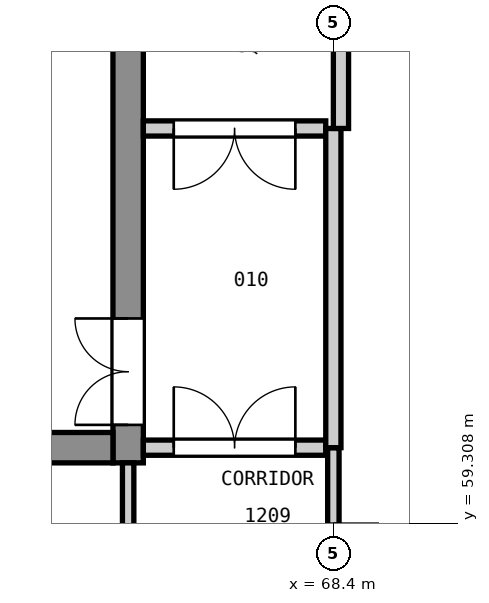
"""IFC4 building model, lengths in metres.
Left out: names, types, materials, properties, quantities, classifications, styles, units other than length and angle.
Written with IfcOpenShell. Run it as: python <this file> out.ifc"""

import sys

from ifc_helpers import new_model, si_unit, direction, frame, frame_2d, origin, place, context, subcontext, project, spatial, rectangle, extrude, element, fill, save


model = new_model("IFC4")
c1 = context("Model", 3, precision=1e-05, world=origin(), true_north=direction((0.0, 1.0)))
c2 = subcontext(c1, "Body", "Model", "MODEL_VIEW")
j1 = project(units=[si_unit("LENGTHUNIT", "METRE"), si_unit("PLANEANGLEUNIT", "RADIAN")], contexts=[c1])
p1 = place(None, origin())
s1 = spatial("IfcSite", under=j1, at=p1, CompositionType="ELEMENT")
p2 = place(p1, origin())
s2 = spatial("IfcBuilding", under=s1, at=p2, CompositionType="ELEMENT")
p3 = place(p2, frame((0.0, 0.0, 60.6)))
s3 = spatial("IfcBuildingStorey", under=s2, at=p3, CompositionType="ELEMENT", Elevation=60.6)
p4 = place(p3, frame((65.7, 60.1, 0.0), z_axis=(0.0, 0.0, 1.0), x_axis=(0.0, 1.0, 0.0)))
e1 = element("IfcWall", 1, at=p4, inside=s3, PredefinedType="SHEAR", context=c2, shape_type="SweptSolid", body=[
    extrude(rectangle(XDim=14.8, YDim=0.4, at=frame_2d((7.4, 0.0))), origin(), (0.0, 0.0, 1.0), 4.55),
])
p5 = place(p4, frame((0.5, 0.0, 0.0)))
e2 = element("IfcOpeningElement", 2, at=p5, cuts=e1, PredefinedType="OPENING", context=c2, shape_type="SweptSolid", body=[
    extrude(rectangle(XDim=1.4, YDim=2.1, at=frame_2d((0.7, 1.05))), frame((0.0, 0.21, 0.0), z_axis=(0.0, -1.0, 0.0), x_axis=(1.0, 0.0, 0.0)), (0.0, 0.0, 1.0), 0.42),
])
p6 = place(p4, frame((8.8, 0.0, 0.0)))
e3 = element("IfcOpeningElement", 3, at=p6, cuts=e1, PredefinedType="OPENING", context=c2, shape_type="SweptSolid", body=[
    extrude(rectangle(XDim=1.1, YDim=2.1, at=frame_2d((0.55, 1.05))), frame((0.0, 0.21, 0.0), z_axis=(0.0, -1.0, 0.0), x_axis=(1.0, 0.0, 0.0)), (0.0, 0.0, 1.0), 0.42),
])
p7 = place(p4, frame((11.35, 0.0, 0.0)))
e4 = element("IfcOpeningElement", 4, at=p7, cuts=e1, PredefinedType="OPENING", context=c2, shape_type="SweptSolid", body=[
    extrude(rectangle(XDim=1.1, YDim=2.1, at=frame_2d((0.55, 1.05))), frame((0.0, 0.21, 0.0), z_axis=(0.0, -1.0, 0.0), x_axis=(1.0, 0.0, 0.0)), (0.0, 0.0, 1.0), 0.42),
])
p8 = place(p3, frame((61.4, 60.3, 0.0), z_axis=(0.0, 0.0, 1.0), x_axis=(1.0, 0.0, 0.0)))
e5 = element("IfcWall", 5, at=p8, inside=s3, PredefinedType="SHEAR", context=c2, shape_type="SweptSolid", body=[
    extrude(rectangle(XDim=4.1, YDim=0.4, at=frame_2d((2.05, 0.0))), origin(), (0.0, 0.0, 1.0), 4.55),
])
p9 = place(p3, frame((65.7, 56.85, 0.0), z_axis=(0.0, 0.0, 1.0), x_axis=(0.0, 1.0, 0.0)))
e6 = element("IfcWall", 6, at=p9, inside=s3, PredefinedType="PARTITIONING", context=c2, shape_type="SweptSolid", body=[
    extrude(rectangle(XDim=3.25, YDim=0.15, at=frame_2d((1.625, 0.0))), origin(), (0.0, 0.0, 1.0), 3.55),
])
p10 = place(p9, frame((1.15, 0.0, 0.0)))
e7 = element("IfcOpeningElement", 7, at=p10, cuts=e6, PredefinedType="OPENING", context=c2, shape_type="SweptSolid", body=[
    extrude(rectangle(XDim=1.0, YDim=2.1, at=frame_2d((0.5, 1.05))), frame((0.0, 0.085, 0.0), z_axis=(0.0, -1.0, 0.0), x_axis=(1.0, 0.0, 0.0)), (0.0, 0.0, 1.0), 0.17),
])
p11 = place(p3, frame((65.9, 60.3, 0.0), z_axis=(0.0, 0.0, 1.0), x_axis=(1.0, 0.0, 0.0)))
e8 = element("IfcWall", 8, at=p11, inside=s3, PredefinedType="PARTITIONING", context=c2, shape_type="SweptSolid", body=[
    extrude(rectangle(XDim=2.4, YDim=0.2, at=frame_2d((1.2, 0.0))), origin(), (0.0, 0.0, 1.0), 3.85),
])
p12 = place(p11, frame((0.4, 0.0, 0.0)))
e9 = element("IfcOpeningElement", 9, at=p12, cuts=e8, PredefinedType="OPENING", context=c2, shape_type="SweptSolid", body=[
    extrude(rectangle(XDim=1.6, YDim=2.1, at=frame_2d((0.8, 1.05))), frame((0.0, 0.11, 0.0), z_axis=(0.0, -1.0, 0.0), x_axis=(1.0, 0.0, 0.0)), (0.0, 0.0, 1.0), 0.22),
])
p13 = place(p3, frame((65.9, 64.5, 0.0), z_axis=(0.0, 0.0, 1.0), x_axis=(1.0, 0.0, 0.0)))
e10 = element("IfcWall", 10, at=p13, inside=s3, PredefinedType="PARTITIONING", context=c2, shape_type="SweptSolid", body=[
    extrude(rectangle(XDim=2.4, YDim=0.2, at=frame_2d((1.2, 0.0))), origin(), (0.0, 0.0, 1.0), 3.55),
])
p14 = place(p13, frame((0.4, 0.0, 0.0)))
e11 = element("IfcOpeningElement", 11, at=p14, cuts=e10, PredefinedType="OPENING", context=c2, shape_type="SweptSolid", body=[
    extrude(rectangle(XDim=1.6, YDim=2.1, at=frame_2d((0.8, 1.05))), frame((0.0, 0.11, 0.0), z_axis=(0.0, -1.0, 0.0), x_axis=(1.0, 0.0, 0.0)), (0.0, 0.0, 1.0), 0.22),
])
p15 = place(p3, frame((68.4, 57.1, 0.0), z_axis=(0.0, 0.0, 1.0), x_axis=(0.0, 1.0, 0.0)))
e12 = element("IfcWall", 12, at=p15, inside=s3, PredefinedType="PARTITIONING", context=c2, shape_type="SweptSolid", body=[
    extrude(rectangle(XDim=3.2, YDim=0.15, at=frame_2d((1.6, 0.0))), origin(), (0.0, 0.0, 1.0), 3.55),
])
p16 = place(p15, frame((1.0, 0.0, 0.0)))
e13 = element("IfcOpeningElement", 13, at=p16, cuts=e12, PredefinedType="OPENING", context=c2, shape_type="SweptSolid", body=[
    extrude(rectangle(XDim=1.2, YDim=2.1, at=frame_2d((0.6, 1.05))), frame((0.0, 0.085, 0.0), z_axis=(0.0, -1.0, 0.0), x_axis=(1.0, 0.0, 0.0)), (0.0, 0.0, 1.0), 0.17),
])
p17 = place(p3, frame((68.4, 60.3, 0.0), z_axis=(0.0, 0.0, 1.0), x_axis=(0.0, 1.0, 0.0)))
e14 = element("IfcWall", 14, at=p17, inside=s3, PredefinedType="PARTITIONING", context=c2, shape_type="SweptSolid", body=[
    extrude(rectangle(XDim=4.2, YDim=0.2, at=frame_2d((2.1, 0.0))), origin(), (0.0, 0.0, 1.0), 3.55),
])
p18 = place(p3, frame((68.5, 64.5, 0.0), z_axis=(0.0, 0.0, 1.0), x_axis=(0.0, 1.0, 0.0)))
e15 = element("IfcWall", 15, at=p18, inside=s3, PredefinedType="PARTITIONING", context=c2, shape_type="SweptSolid", body=[
    extrude(rectangle(XDim=2.6, YDim=0.2, at=frame_2d((1.3, 0.0))), origin(), (0.0, 0.0, 1.0), 3.55),
])
p19 = place(p5, origin())
e16 = element("IfcDoor", 16, at=p19, inside=s3, OperationType="DOUBLE_DOOR_SINGLE_SWING", PredefinedType="DOOR", context=c2, shape_type="SweptSolid", body=[
    extrude(rectangle(XDim=1.4, YDim=2.1, at=frame_2d((0.7, 1.05))), frame((0.0, 0.025, 0.0), z_axis=(0.0, -1.0, 0.0), x_axis=(1.0, 0.0, 0.0)), (0.0, 0.0, 1.0), 0.05),
])
fill(e2, e16)
p20 = place(p12, origin())
e17 = element("IfcDoor", 17, at=p20, inside=s3, OperationType="DOUBLE_DOOR_SINGLE_SWING", PredefinedType="DOOR", context=c2, shape_type="SweptSolid", body=[
    extrude(rectangle(XDim=1.6, YDim=2.1, at=frame_2d((0.8, 1.05))), frame((0.0, 0.025, 0.0), z_axis=(0.0, -1.0, 0.0), x_axis=(1.0, 0.0, 0.0)), (0.0, 0.0, 1.0), 0.05),
])
fill(e9, e17)
p21 = place(p14, frame((1.6, 0.0, 0.0), z_axis=(0.0, 0.0, 1.0), x_axis=(-1.0, 0.0, 0.0)))
e18 = element("IfcDoor", 18, at=p21, inside=s3, OperationType="DOUBLE_DOOR_SINGLE_SWING", PredefinedType="DOOR", context=c2, shape_type="SweptSolid", body=[
    extrude(rectangle(XDim=1.6, YDim=2.1, at=frame_2d((0.8, 1.05))), frame((0.0, 0.025, 0.0), z_axis=(0.0, -1.0, 0.0), x_axis=(1.0, 0.0, 0.0)), (0.0, 0.0, 1.0), 0.05),
])
fill(e11, e18)
save(model, sys.argv[1])
